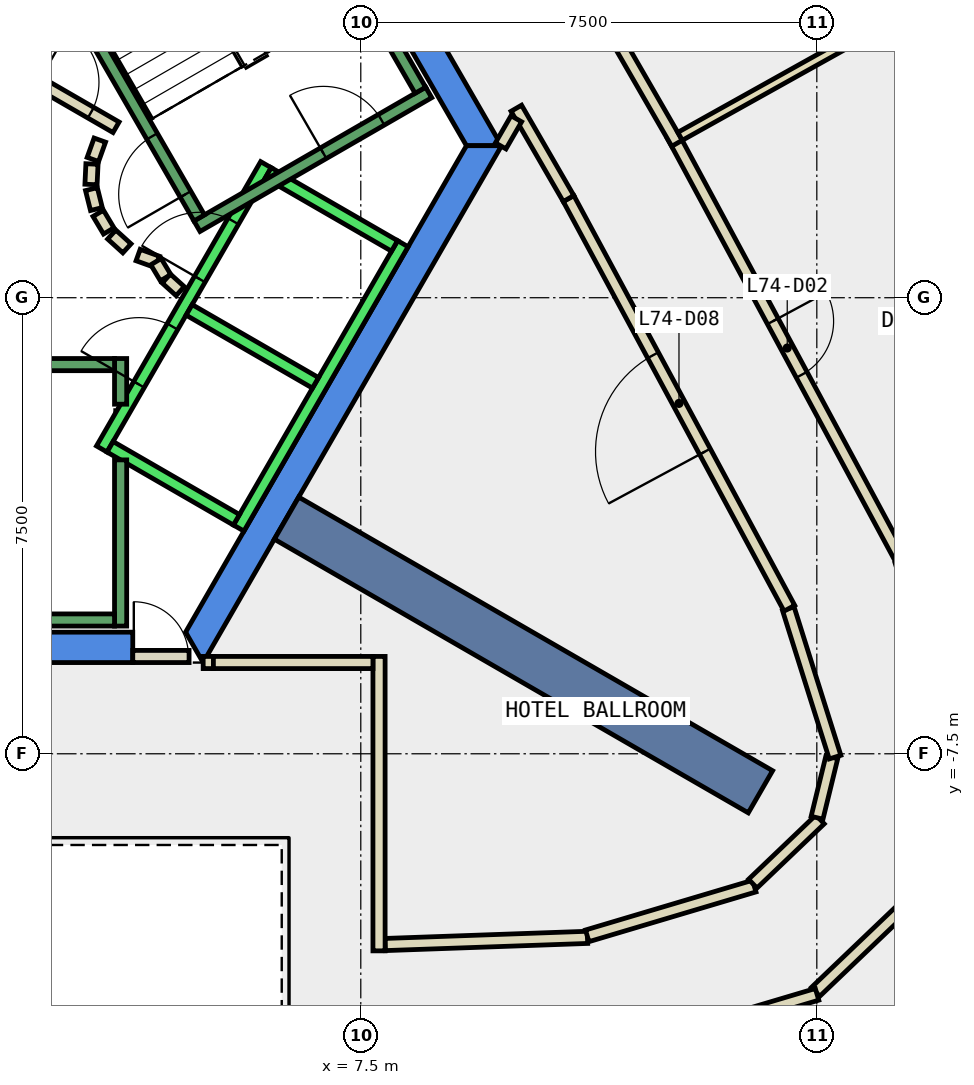
"""IFC4 building model, lengths in metres.
Left out: names, types, materials, properties, quantities, classifications, styles, units other than length and angle.
Written with IfcOpenShell. Run it as: python <this file> out.ifc"""

import sys

from ifc_helpers import new_model, si_unit, direction, frame, frame_2d, origin, place, context, subcontext, project, spatial, polyline, rectangle, outline, extrude, element, fill, save


model = new_model("IFC4")
c1 = context("Model", 3, precision=1e-05, world=origin(), true_north=direction((0.0, 1.0)))
c2 = subcontext(c1, "Body", "Model", "MODEL_VIEW")
j1 = project(units=[si_unit("LENGTHUNIT", "METRE"), si_unit("PLANEANGLEUNIT", "RADIAN")], contexts=[c1])
p1 = place(None, origin())
s1 = spatial("IfcSite", under=j1, at=p1, CompositionType="ELEMENT")
p2 = place(p1, origin())
s2 = spatial("IfcBuilding", under=s1, at=p2, CompositionType="ELEMENT")
p3 = place(p2, frame((0.0, 0.0, 315.2)))
s3 = spatial("IfcBuildingStorey", under=s2, at=p3, CompositionType="ELEMENT", Elevation=315.2)
p4 = place(p3, frame((0.0, 0.0, -0.34)))
e1 = element("IfcWall", 1, at=p4, inside=s3, PredefinedType="SHEAR", context=c2, shape_type="SweptSolid", body=[
    extrude(outline(polyline([(5.486, 9.998), (5.053, 9.748), (9.238, 2.5), (9.815, 2.5), (5.486, 9.998)])), origin(), (0.0, 0.0, 1.0), 3.6),
])
p5 = place(p3, frame((0.0, 0.0, -0.34)))
e2 = element("IfcWall", 2, at=p5, inside=s3, PredefinedType="SHEAR", context=c2, shape_type="SweptSolid", body=[
    extrude(outline(polyline([(3.75, -6.0), (3.75, -5.5), (-4.619, -5.5), (-4.907, -6.0), (3.75, -6.0)])), origin(), (0.0, 0.0, 1.0), 3.6),
])
p6 = place(p3, frame((0.0, 0.0, -0.34)))
e3 = element("IfcWall", 3, at=p6, inside=s3, PredefinedType="SHEAR", context=c2, shape_type="SweptSolid", body=[
    extrude(outline(polyline([(4.907, -6.0), (9.815, 2.5), (9.238, 2.5), (4.619, -5.5), (4.907, -6.0)])), origin(), (0.0, 0.0, 1.0), 3.6),
])
p7 = place(p3, frame((6.279, -3.625, -0.34), z_axis=(0.0, 0.0, 1.0), x_axis=(0.866017533419, -0.500013631625, 0.0)))
e4 = element("IfcWall", 4, at=p7, inside=s3, PredefinedType="SHEAR", context=c2, shape_type="SweptSolid", body=[
    extrude(rectangle(XDim=9.0, YDim=0.8, at=frame_2d((4.5, 0.0))), origin(), (0.0, 0.0, 1.0), 3.6),
])
p8 = place(p3, frame((7.9, -10.637, 0.0), z_axis=(0.0, 0.0, 1.0), x_axis=(0.999372900517, 0.035409119054, 0.0)))
e5 = element("IfcWall", 5, at=p8, inside=s3, PredefinedType="PARTITIONING", context=c2, shape_type="SweptSolid", body=[
    extrude(rectangle(XDim=3.33, YDim=0.2, at=frame_2d((1.665, 0.0))), origin(), (0.0, 0.0, 1.0), 3.26),
])
p9 = place(p3, frame((11.224, -10.494, 0.0), z_axis=(0.0, 0.0, 1.0), x_axis=(0.958417413979, 0.285370041492, 0.0)))
e6 = element("IfcWall", 6, at=p9, inside=s3, PredefinedType="PARTITIONING", context=c2, shape_type="SweptSolid", body=[
    extrude(rectangle(XDim=2.866, YDim=0.2, at=frame_2d((1.433, 0.0))), origin(), (0.0, 0.0, 1.0), 3.26),
])
p10 = place(p3, frame((13.947, -9.636, 0.0), z_axis=(0.0, 0.0, 1.0), x_axis=(0.723283043556, 0.690551691696, 0.0)))
e7 = element("IfcWall", 7, at=p10, inside=s3, PredefinedType="PARTITIONING", context=c2, shape_type="SweptSolid", body=[
    extrude(rectangle(XDim=1.529, YDim=0.2, at=frame_2d((0.765, 0.0))), origin(), (0.0, 0.0, 1.0), 3.26),
])
p11 = place(p3, frame((15.004, -8.552, 0.0), z_axis=(0.0, 0.0, 1.0), x_axis=(0.237373129266, 0.971418549083, 0.0)))
e8 = element("IfcWall", 8, at=p11, inside=s3, PredefinedType="PARTITIONING", context=c2, shape_type="SweptSolid", body=[
    extrude(rectangle(XDim=1.024, YDim=0.2, at=frame_2d((0.512, 0.0))), origin(), (0.0, 0.0, 1.0), 3.26),
])
p12 = place(p3, frame((15.3, -7.555, 0.0), z_axis=(0.0, 0.0, 1.0), x_axis=(-0.300501248013, 0.953781421471, 0.0)))
e9 = element("IfcWall", 9, at=p12, inside=s3, PredefinedType="PARTITIONING", context=c2, shape_type="SweptSolid", body=[
    extrude(rectangle(XDim=2.559, YDim=0.2, at=frame_2d((1.28, 0.0))), origin(), (0.0, 0.0, 1.0), 3.26),
])
p13 = place(p3, frame((14.549, -5.107, 0.0), z_axis=(0.0, 0.0, 1.0), x_axis=(-0.47449538478, 0.880257990491, 0.0)))
e10 = element("IfcWall", 10, at=p13, inside=s3, PredefinedType="PARTITIONING", context=c2, shape_type="SweptSolid", body=[
    extrude(rectangle(XDim=7.655, YDim=0.2, at=frame_2d((3.827, 0.0))), origin(), (0.0, 0.0, 1.0), 3.26),
])
p14 = place(p13, frame((2.927, 0.0, 0.0)))
e11 = element("IfcOpeningElement", 11, at=p14, cuts=e10, PredefinedType="OPENING", context=c2, shape_type="SweptSolid", body=[
    extrude(rectangle(XDim=1.8, YDim=2.1, at=frame_2d((0.9, 1.05))), frame((0.0, 0.11, 0.0), z_axis=(0.0, -1.0, 0.0), x_axis=(1.0, 0.0, 0.0)), (0.0, 0.0, 1.0), 0.22),
])
p15 = place(p3, frame((10.917, 1.631, 0.0), z_axis=(0.0, 0.0, 1.0), x_axis=(-0.500699613169, 0.865621104972, 0.0)))
e12 = element("IfcWall", 12, at=p15, inside=s3, PredefinedType="PARTITIONING", context=c2, shape_type="SweptSolid", body=[
    extrude(rectangle(XDim=1.715, YDim=0.2, at=frame_2d((0.858, 0.0))), origin(), (0.0, 0.0, 1.0), 3.26),
])
p16 = place(p3, frame((10.058, 2.943, 0.0), z_axis=(0.0, 0.0, 1.0), x_axis=(-0.499352927503, -0.866398669086, 0.0)))
e13 = element("IfcWall", 13, at=p16, inside=s3, PredefinedType="PARTITIONING", context=c2, shape_type="SweptSolid", body=[
    extrude(rectangle(XDim=0.515, YDim=0.2, at=frame_2d((0.257, 0.0))), origin(), (0.0, 0.0, 1.0), 3.26),
])
p17 = place(p3, frame((12.628, 2.671, 0.0), z_axis=(0.0, 0.0, 1.0), x_axis=(0.474489967676, -0.880260910512, 0.0)))
e14 = element("IfcWall", 14, at=p17, inside=s3, PredefinedType="PARTITIONING", context=c2, shape_type="SweptSolid", body=[
    extrude(rectangle(XDim=7.948, YDim=0.2, at=frame_2d((3.974, 0.0))), origin(), (0.0, 0.0, 1.0), 3.26),
])
p18 = place(p17, frame((3.474, 0.0, 0.0)))
e15 = element("IfcOpeningElement", 15, at=p18, cuts=e14, PredefinedType="OPENING", context=c2, shape_type="SweptSolid", body=[
    extrude(rectangle(XDim=1.0, YDim=2.1, at=frame_2d((0.5, 1.05))), frame((0.0, 0.11, 0.0), z_axis=(0.0, -1.0, 0.0), x_axis=(1.0, 0.0, 0.0)), (0.0, 0.0, 1.0), 0.22),
])
p19 = place(p3, frame((16.857, -9.622, 0.0), z_axis=(0.0, 0.0, 1.0), x_axis=(-0.723099256445, -0.690744138831, 0.0)))
e16 = element("IfcWall", 16, at=p19, inside=s3, PredefinedType="PARTITIONING", context=c2, shape_type="SweptSolid", body=[
    extrude(rectangle(XDim=2.596, YDim=0.2, at=frame_2d((1.298, 0.0))), origin(), (0.0, 0.0, 1.0), 3.26),
])
p20 = place(p3, frame((15.004, -11.456, 0.0), z_axis=(0.0, 0.0, 1.0), x_axis=(-0.958459796003, -0.285227662485, 0.0)))
e17 = element("IfcWall", 17, at=p20, inside=s3, PredefinedType="PARTITIONING", context=c2, shape_type="SweptSolid", body=[
    extrude(rectangle(XDim=3.604, YDim=0.2, at=frame_2d((1.802, 0.0))), origin(), (0.0, 0.0, 1.0), 3.26),
])
p21 = place(p3, frame((8.588, 9.665, 0.0), z_axis=(0.0, 0.0, 1.0), x_axis=(0.499946799636, -0.86605611685, 0.0)))
e18 = element("IfcWall", 18, at=p21, inside=s3, PredefinedType="PARTITIONING", context=c2, shape_type="SweptSolid", body=[
    extrude(rectangle(XDim=8.227, YDim=0.2, at=frame_2d((4.114, 0.0))), origin(), (0.0, 0.0, 1.0), 3.26),
])
p22 = place(p21, frame((3.613, 0.0, 0.0)))
e19 = element("IfcOpeningElement", 19, at=p22, cuts=e18, PredefinedType="OPENING", context=c2, shape_type="SweptSolid", body=[
    extrude(rectangle(XDim=1.0, YDim=2.1, at=frame_2d((0.5, 1.05))), frame((0.0, 0.11, 0.0), z_axis=(0.0, -1.0, 0.0), x_axis=(1.0, 0.0, 0.0)), (0.0, 0.0, 1.0), 0.22),
])
p23 = place(p3, frame((1.866, 3.732, 0.0), z_axis=(0.0, 0.0, 1.0), x_axis=(0.866043361281, -0.499968895414, 0.0)))
e20 = element("IfcWall", 20, at=p23, inside=s3, PredefinedType="PARTITIONING", context=c2, shape_type="SweptSolid", body=[
    extrude(rectangle(XDim=1.858, YDim=0.2, at=frame_2d((0.929, 0.0))), origin(), (0.0, 0.0, 1.0), 3.26),
])
p24 = place(p23, frame((0.379, 0.0, 0.0)))
e21 = element("IfcOpeningElement", 21, at=p24, cuts=e20, PredefinedType="OPENING", context=c2, shape_type="SweptSolid", body=[
    extrude(rectangle(XDim=1.0, YDim=2.1, at=frame_2d((0.5, 1.05))), frame((0.0, 0.11, 0.0), z_axis=(0.0, -1.0, 0.0), x_axis=(1.0, 0.0, 0.0)), (0.0, 0.0, 1.0), 0.22),
])
p25 = place(p3, frame((3.208, 2.592, 0.0), z_axis=(0.0, 0.0, 1.0), x_axis=(-0.337388820924, -0.941365382578, 0.0)))
e22 = element("IfcWall", 22, at=p25, inside=s3, PredefinedType="PARTITIONING", context=c2, shape_type="SweptSolid", body=[
    extrude(rectangle(XDim=0.338, YDim=0.2, at=frame_2d((0.169, 0.0))), origin(), (0.0, 0.0, 1.0), 3.26),
])
p26 = place(p3, frame((3.079, 2.199, 0.0), z_axis=(0.0, 0.0, 1.0), x_axis=(-0.047771483479, -0.998858290933, 0.0)))
e23 = element("IfcWall", 23, at=p26, inside=s3, PredefinedType="PARTITIONING", context=c2, shape_type="SweptSolid", body=[
    extrude(rectangle(XDim=0.337, YDim=0.2, at=frame_2d((0.169, 0.0))), origin(), (0.0, 0.0, 1.0), 3.26),
])
p27 = place(p3, frame((3.07, 1.786, 0.0), z_axis=(0.0, 0.0, 1.0), x_axis=(0.242705583207, -0.970099994784, 0.0)))
e24 = element("IfcWall", 24, at=p27, inside=s3, PredefinedType="PARTITIONING", context=c2, shape_type="SweptSolid", body=[
    extrude(rectangle(XDim=0.338, YDim=0.2, at=frame_2d((0.169, 0.0))), origin(), (0.0, 0.0, 1.0), 3.26),
])
for number, where, z_axis, x_axis in (
    (25, (3.182, 1.388, 0.0), (0.0, 0.0, 1.0), (0.512, -0.859, 0.0)),
    (26, (3.404, 1.039, 0.0), (0.0, 0.0, 1.0), (0.74, -0.672, 0.0)),
):
    element("IfcWall", number, at=place(p3, frame(where, z_axis=z_axis, x_axis=x_axis)), inside=s3, PredefinedType="PARTITIONING", context=c2, shape_type="SweptSolid", body=[
        extrude(rectangle(XDim=0.338, YDim=0.2, at=frame_2d((0.169, 0.0))), origin(), (0.0, 0.0, 1.0), 3.26),
    ])
p28 = place(p3, frame((3.838, 0.702, 0.0), z_axis=(0.0, 0.0, 1.0), x_axis=(0.941035081519, -0.338308993895, 0.0)))
e27 = element("IfcWall", 27, at=p28, inside=s3, PredefinedType="PARTITIONING", context=c2, shape_type="SweptSolid", body=[
    extrude(rectangle(XDim=0.337, YDim=0.2, at=frame_2d((0.168, 0.0))), origin(), (0.0, 0.0, 1.0), 3.26),
])
p29 = place(p3, frame((4.132, 0.593, 0.0), z_axis=(0.0, 0.0, 1.0), x_axis=(0.513561617048, -0.858052717201, 0.0)))
e28 = element("IfcWall", 28, at=p29, inside=s3, PredefinedType="PARTITIONING", context=c2, shape_type="SweptSolid", body=[
    extrude(rectangle(XDim=0.308, YDim=0.2, at=frame_2d((0.154, 0.0))), origin(), (0.0, 0.0, 1.0), 3.26),
])
p30 = place(p3, frame((4.301, 0.315, 0.0), z_axis=(0.0, 0.0, 1.0), x_axis=(0.741798017506, -0.670623367639, 0.0)))
e29 = element("IfcWall", 29, at=p30, inside=s3, PredefinedType="PARTITIONING", context=c2, shape_type="SweptSolid", body=[
    extrude(rectangle(XDim=0.309, YDim=0.2, at=frame_2d((0.154, 0.0))), origin(), (0.0, 0.0, 1.0), 3.26),
])
p31 = place(p3, frame((4.908, -5.999, 0.0), z_axis=(0.0, 0.0, 1.0), x_axis=(1.0, 0.0, 0.0)))
e30 = element("IfcWall", 30, at=p31, inside=s3, PredefinedType="PARTITIONING", context=c2, shape_type="SweptSolid", body=[
    extrude(rectangle(XDim=0.168, YDim=0.2, at=frame_2d((0.084, 0.0))), origin(), (0.0, 0.0, 1.0), 2.4),
])
p32 = place(p3, frame((7.8, -5.899, 0.0), z_axis=(0.0, 0.0, 1.0), x_axis=(0.0, -1.0, 0.0)))
e31 = element("IfcWall", 31, at=p32, inside=s3, PredefinedType="PARTITIONING", context=c2, shape_type="SweptSolid", body=[
    extrude(rectangle(XDim=4.842, YDim=0.2, at=frame_2d((2.421, 0.0))), origin(), (0.0, 0.0, 1.0), 3.26),
])
p33 = place(p3, frame((12.751, 2.654, 0.0), z_axis=(0.0, 0.0, 1.0), x_axis=(0.873277679945, 0.487222837837, 0.0)))
e32 = element("IfcWall", 32, at=p33, inside=s3, PredefinedType="PARTITIONING", context=c2, shape_type="SweptSolid", body=[
    extrude(rectangle(XDim=4.38, YDim=0.15, at=frame_2d((2.19, 0.0))), origin(), (0.0, 0.0, 1.0), 3.26),
])
p34 = place(p3, frame((3.75, -5.9, 0.0), z_axis=(0.0, 0.0, 1.0), x_axis=(1.0, 0.0, 0.0)))
e33 = element("IfcWall", 33, at=p34, inside=s3, PredefinedType="PARTITIONING", context=c2, shape_type="SweptSolid", body=[
    extrude(rectangle(XDim=0.926, YDim=0.2, at=frame_2d((0.463, 0.0))), origin(), (0.0, 0.0, 1.0), 2.4),
])
p35 = place(p34, frame((0.017, 0.0, 0.0)))
e34 = element("IfcOpeningElement", 34, at=p35, cuts=e33, PredefinedType="OPENING", context=c2, shape_type="SweptSolid", body=[
    extrude(rectangle(XDim=0.9, YDim=2.1, at=frame_2d((0.45, 1.05))), frame((0.0, 0.11, 0.0), z_axis=(0.0, -1.0, 0.0), x_axis=(1.0, 0.0, 0.0)), (0.0, 0.0, 1.0), 0.22),
])
p36 = place(p3, frame((5.076, -5.999, 0.0), z_axis=(0.0, 0.0, 1.0), x_axis=(1.0, 0.0, 0.0)))
e35 = element("IfcWall", 35, at=p36, inside=s3, PredefinedType="PARTITIONING", context=c2, shape_type="SweptSolid", body=[
    extrude(rectangle(XDim=2.624, YDim=0.2, at=frame_2d((1.312, 0.0))), origin(), (0.0, 0.0, 1.0), 3.26),
])
p37 = place(p3, frame((3.24, -2.488, 0.0), z_axis=(0.0, 0.0, 1.0), x_axis=(0.500034260056, 0.866005622828, 0.0)))
e36 = element("IfcWall", 36, at=p37, inside=s3, PredefinedType="STANDARD", context=c2, shape_type="SweptSolid", body=[
    extrude(rectangle(XDim=5.399, YDim=0.2, at=frame_2d((2.7, 0.0))), origin(), (0.0, 0.0, 1.0), 3.26),
])
p38 = place(p37, frame((3.225, 0.0, 0.0)))
e37 = element("IfcOpeningElement", 37, at=p38, cuts=e36, PredefinedType="OPENING", context=c2, shape_type="SweptSolid", body=[
    extrude(rectangle(XDim=1.1, YDim=2.1, at=frame_2d((0.55, 1.05))), frame((0.0, 0.11, 0.0), z_axis=(0.0, -1.0, 0.0), x_axis=(1.0, 0.0, 0.0)), (0.0, 0.0, 1.0), 0.22),
])
p39 = place(p37, frame((1.225, 0.0, 0.0)))
e38 = element("IfcOpeningElement", 38, at=p39, cuts=e36, PredefinedType="OPENING", context=c2, shape_type="SweptSolid", body=[
    extrude(rectangle(XDim=1.1, YDim=2.1, at=frame_2d((0.55, 1.05))), frame((0.0, 0.11, 0.0), z_axis=(0.0, -1.0, 0.0), x_axis=(1.0, 0.0, 0.0)), (0.0, 0.0, 1.0), 0.22),
])
p40 = place(p3, frame((5.492, -3.788, 0.0), z_axis=(0.0, 0.0, 1.0), x_axis=(0.500034260056, 0.866005622828, 0.0)))
e39 = element("IfcWall", 39, at=p40, inside=s3, PredefinedType="STANDARD", context=c2, shape_type="SweptSolid", body=[
    extrude(rectangle(XDim=5.399, YDim=0.2, at=frame_2d((2.7, 0.0))), origin(), (0.0, 0.0, 1.0), 3.26),
])
p41 = place(p3, frame((3.377, -2.452, 0.0), z_axis=(0.0, 0.0, 1.0), x_axis=(0.865955154139, -0.50012165622, 0.0)))
e40 = element("IfcWall", 40, at=p41, inside=s3, PredefinedType="STANDARD", context=c2, shape_type="SweptSolid", body=[
    extrude(rectangle(XDim=2.4, YDim=0.2, at=frame_2d((1.2, 0.0))), origin(), (0.0, 0.0, 1.0), 3.26),
])
for number, where, z_axis, x_axis in (
    (41, (4.677, -0.2, 0.0), (0.0, 0.0, 1.0), (0.866, -0.5, 0.0)),
    (42, (5.977, 2.052, 0.0), (0.0, 0.0, 1.0), (0.866, -0.5, 0.0)),
):
    element("IfcWall", number, at=place(p3, frame(where, z_axis=z_axis, x_axis=x_axis)), inside=s3, PredefinedType="STANDARD", context=c2, shape_type="SweptSolid", body=[
        extrude(rectangle(XDim=2.399, YDim=0.2, at=frame_2d((1.2, 0.0))), origin(), (0.0, 0.0, 1.0), 3.26),
    ])
p42 = place(p3, frame((3.55, -2.667, 0.0), z_axis=(0.0, 0.0, 1.0), x_axis=(0.0, -1.0, 0.0)))
e43 = element("IfcWall", 43, at=p42, inside=s3, PredefinedType="STANDARD", context=c2, shape_type="SweptSolid", body=[
    extrude(rectangle(XDim=2.733, YDim=0.2, at=frame_2d((1.366, 0.0))), origin(), (0.0, 0.0, 1.0), 3.26),
])
p43 = place(p3, frame((3.55, -1.0, 0.0), z_axis=(0.0, 0.0, 1.0), x_axis=(0.0, -1.0, 0.0)))
e44 = element("IfcWall", 44, at=p43, inside=s3, PredefinedType="STANDARD", context=c2, shape_type="SweptSolid", body=[
    extrude(rectangle(XDim=0.751, YDim=0.2, at=frame_2d((0.375, 0.0))), origin(), (0.0, 0.0, 1.0), 3.26),
])
p44 = place(p3, frame((-3.45, -1.1, 0.0), z_axis=(0.0, 0.0, 1.0), x_axis=(1.0, 0.0, 0.0)))
e45 = element("IfcWall", 45, at=p44, inside=s3, PredefinedType="STANDARD", context=c2, shape_type="SweptSolid", body=[
    extrude(rectangle(XDim=6.9, YDim=0.2, at=frame_2d((3.45, 0.0))), origin(), (0.0, 0.0, 1.0), 3.26),
])
p45 = place(p44, frame((0.45, 0.0, 0.0)))
e46 = element("IfcOpeningElement", 46, at=p45, cuts=e45, PredefinedType="OPENING", context=c2, shape_type="SweptSolid", body=[
    extrude(rectangle(XDim=1.1, YDim=2.2, at=frame_2d((0.55, 1.1))), frame((0.0, 0.11, 0.0), z_axis=(0.0, -1.0, 0.0), x_axis=(1.0, 0.0, 0.0)), (0.0, 0.0, 1.0), 0.22),
])
p46 = place(p3, frame((-3.45, -5.3, 0.0), z_axis=(0.0, 0.0, 1.0), x_axis=(1.0, 0.0, 0.0)))
e47 = element("IfcWall", 47, at=p46, inside=s3, PredefinedType="STANDARD", context=c2, shape_type="SweptSolid", body=[
    extrude(rectangle(XDim=6.9, YDim=0.2, at=frame_2d((3.45, 0.0))), origin(), (0.0, 0.0, 1.0), 3.26),
])
p47 = place(p3, frame((4.806, 1.176, 0.0), z_axis=(0.0, 0.0, 1.0), x_axis=(0.866059941101, 0.499940174841, 0.0)))
e48 = element("IfcWall", 48, at=p47, inside=s3, PredefinedType="STANDARD", context=c2, shape_type="SweptSolid", body=[
    extrude(rectangle(XDim=4.4, YDim=0.2, at=frame_2d((2.2, 0.0))), origin(), (0.0, 0.0, 1.0), 3.26),
])
p48 = place(p47, frame((2.4, 0.0, 0.0)))
e49 = element("IfcOpeningElement", 49, at=p48, cuts=e48, PredefinedType="OPENING", context=c2, shape_type="SweptSolid", body=[
    extrude(rectangle(XDim=1.1, YDim=2.2, at=frame_2d((0.55, 1.1))), frame((0.0, 0.11, 0.0), z_axis=(0.0, -1.0, 0.0), x_axis=(1.0, 0.0, 0.0)), (0.0, 0.0, 1.0), 0.22),
])
p49 = place(p3, frame((4.843, 1.312, 0.0), z_axis=(0.0, 0.0, 1.0), x_axis=(-0.499963383562, 0.866046543262, 0.0)))
e50 = element("IfcWall", 50, at=p49, inside=s3, PredefinedType="STANDARD", context=c2, shape_type="SweptSolid", body=[
    extrude(rectangle(XDim=6.9, YDim=0.2, at=frame_2d((3.45, 0.0))), origin(), (0.0, 0.0, 1.0), 3.26),
])
p50 = place(p49, frame((0.45, 0.0, 0.0)))
e51 = element("IfcOpeningElement", 51, at=p50, cuts=e50, PredefinedType="OPENING", context=c2, shape_type="SweptSolid", body=[
    extrude(rectangle(XDim=1.1, YDim=2.2, at=frame_2d((0.55, 1.1))), frame((0.0, 0.11, 0.0), z_axis=(0.0, -1.0, 0.0), x_axis=(1.0, 0.0, 0.0)), (0.0, 0.0, 1.0), 0.22),
])
p51 = place(p3, frame((8.48, 3.412, 0.0), z_axis=(0.0, 0.0, 1.0), x_axis=(-0.499978703459, 0.866037698999, 0.0)))
e52 = element("IfcWall", 52, at=p51, inside=s3, PredefinedType="STANDARD", context=c2, shape_type="SweptSolid", body=[
    extrude(rectangle(XDim=6.9, YDim=0.2, at=frame_2d((3.45, 0.0))), origin(), (0.0, 0.0, 1.0), 3.26),
])
p52 = place(p18, origin())
e53 = element("IfcDoor", 53, at=p52, inside=s3, OperationType="SINGLE_SWING_LEFT", PredefinedType="DOOR", context=c2, shape_type="SweptSolid", body=[
    extrude(rectangle(XDim=1.0, YDim=2.1, at=frame_2d((0.5, 1.05))), frame((0.0, 0.025, 0.0), z_axis=(0.0, -1.0, 0.0), x_axis=(1.0, 0.0, 0.0)), (0.0, 0.0, 1.0), 0.05),
])
fill(e15, e53)
p53 = place(p14, origin())
e54 = element("IfcDoor", 54, at=p53, inside=s3, OperationType="DOUBLE_DOOR_SINGLE_SWING", PredefinedType="DOOR", context=c2, shape_type="SweptSolid", body=[
    extrude(rectangle(XDim=1.8, YDim=2.1, at=frame_2d((0.9, 1.05))), frame((0.0, 0.025, 0.0), z_axis=(0.0, -1.0, 0.0), x_axis=(1.0, 0.0, 0.0)), (0.0, 0.0, 1.0), 0.05),
])
fill(e11, e54)
p54 = place(p24, origin())
e55 = element("IfcDoor", 55, at=p54, inside=s3, OperationType="SINGLE_SWING_LEFT", PredefinedType="DOOR", context=c2, shape_type="SweptSolid", body=[
    extrude(rectangle(XDim=1.0, YDim=2.1, at=frame_2d((0.5, 1.05))), frame((0.0, 0.025, 0.0), z_axis=(0.0, -1.0, 0.0), x_axis=(1.0, 0.0, 0.0)), (0.0, 0.0, 1.0), 0.05),
])
fill(e21, e55)
p55 = place(p35, origin())
e56 = element("IfcDoor", 56, at=p55, inside=s3, OperationType="SINGLE_SWING_LEFT", PredefinedType="DOOR", context=c2, shape_type="SweptSolid", body=[
    extrude(rectangle(XDim=0.9, YDim=2.1, at=frame_2d((0.45, 1.05))), frame((0.0, 0.025, 0.0), z_axis=(0.0, -1.0, 0.0), x_axis=(1.0, 0.0, 0.0)), (0.0, 0.0, 1.0), 0.05),
])
fill(e34, e56)
p56 = place(p38, origin())
e57 = element("IfcDoor", 57, at=p56, inside=s3, OperationType="SLIDING_TO_LEFT", PredefinedType="DOOR", context=c2, shape_type="SweptSolid", body=[
    extrude(rectangle(XDim=1.1, YDim=2.1, at=frame_2d((0.55, 1.05))), frame((0.0, 0.025, 0.0), z_axis=(0.0, -1.0, 0.0), x_axis=(1.0, 0.0, 0.0)), (0.0, 0.0, 1.0), 0.05),
])
fill(e37, e57)
p57 = place(p39, origin())
e58 = element("IfcDoor", 58, at=p57, inside=s3, OperationType="SLIDING_TO_LEFT", PredefinedType="DOOR", context=c2, shape_type="SweptSolid", body=[
    extrude(rectangle(XDim=1.1, YDim=2.1, at=frame_2d((0.55, 1.05))), frame((0.0, 0.025, 0.0), z_axis=(0.0, -1.0, 0.0), x_axis=(1.0, 0.0, 0.0)), (0.0, 0.0, 1.0), 0.05),
])
fill(e38, e58)
p58 = place(p50, origin())
e59 = element("IfcDoor", 59, at=p58, inside=s3, OperationType="SINGLE_SWING_LEFT", PredefinedType="DOOR", context=c2, shape_type="SweptSolid", body=[
    extrude(rectangle(XDim=1.1, YDim=2.2, at=frame_2d((0.55, 1.1))), frame((0.0, 0.025, 0.0), z_axis=(0.0, -1.0, 0.0), x_axis=(1.0, 0.0, 0.0)), (0.0, 0.0, 1.0), 0.05),
])
fill(e51, e59)
p59 = place(p48, origin())
e60 = element("IfcDoor", 60, at=p59, inside=s3, OperationType="SINGLE_SWING_LEFT", PredefinedType="DOOR", context=c2, shape_type="SweptSolid", body=[
    extrude(rectangle(XDim=1.1, YDim=2.2, at=frame_2d((0.55, 1.1))), frame((0.0, 0.025, 0.0), z_axis=(0.0, -1.0, 0.0), x_axis=(1.0, 0.0, 0.0)), (0.0, 0.0, 1.0), 0.05),
])
fill(e49, e60)
save(model, sys.argv[1])
